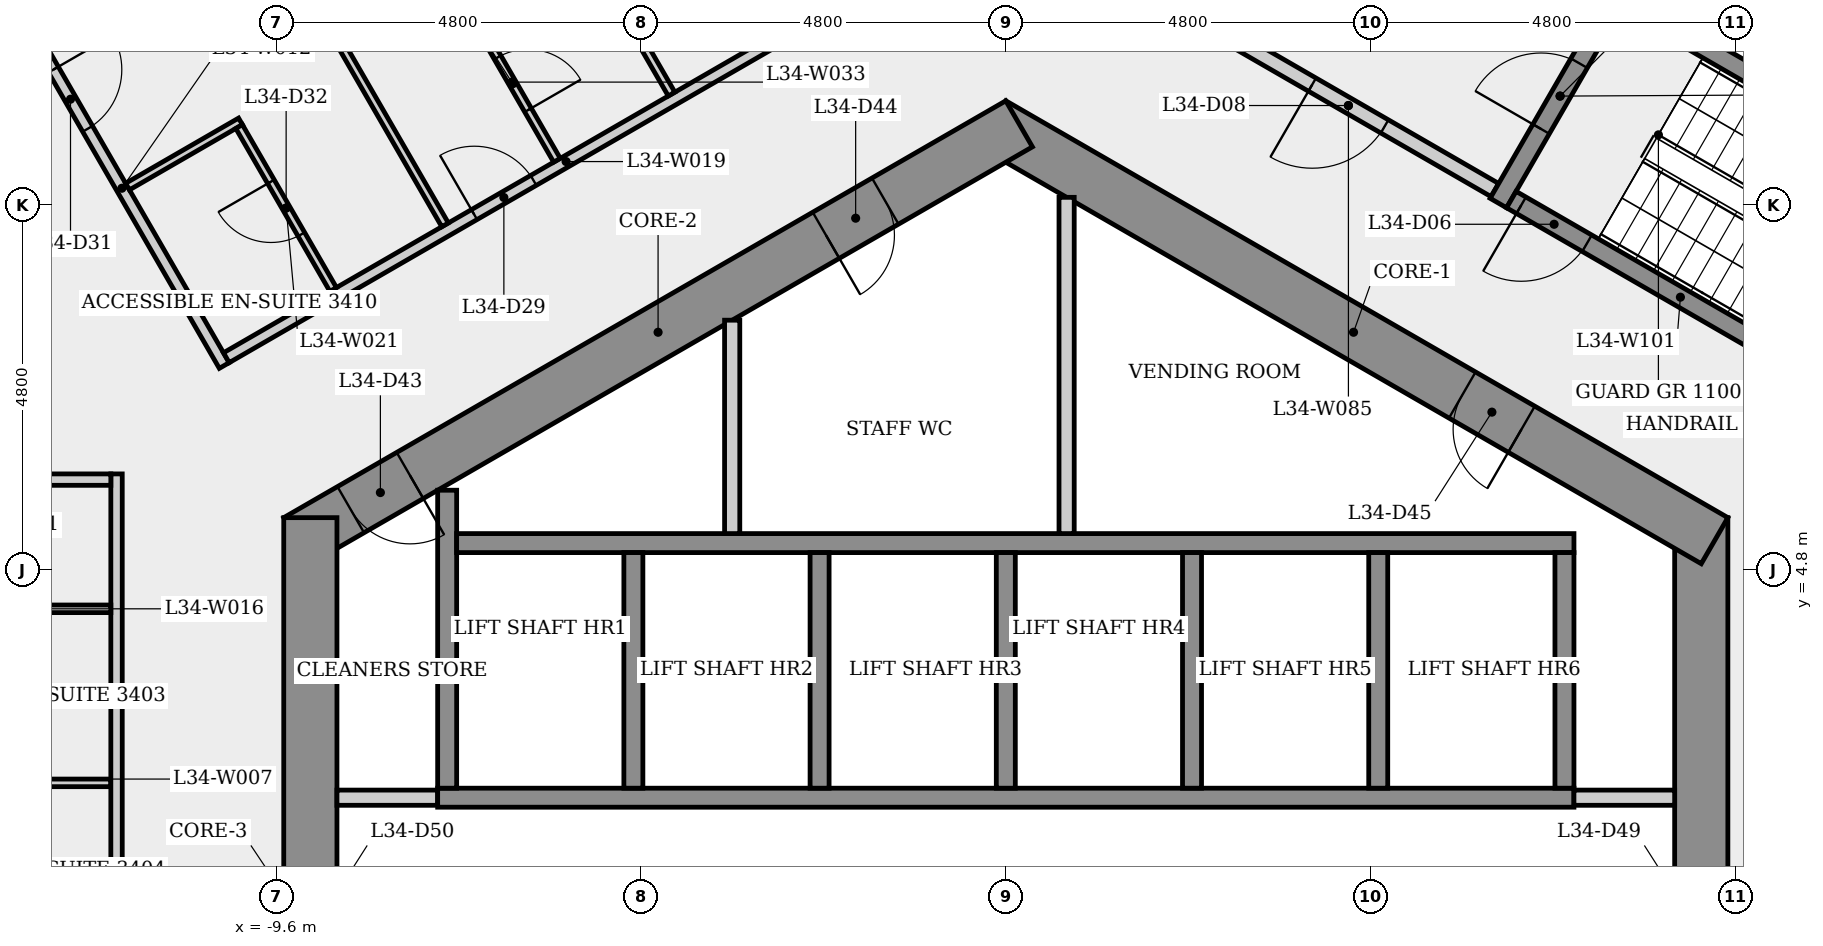
"""IFC4 building model, lengths in metres.
Left out: names, types, materials, properties, quantities, classifications, styles, units other than length and angle.
Written with IfcOpenShell. Run it as: python <this file> out.ifc"""

import sys

from ifc_helpers import new_model, si_unit, direction, frame, frame_2d, origin, place, context, subcontext, project, spatial, rectangle, extrude, element, fill, save


model = new_model("IFC4")
c1 = context("Model", 3, precision=1e-05, world=origin(), true_north=direction((0.0, 1.0)))
c2 = subcontext(c1, "Body", "Model", "MODEL_VIEW")
j1 = project(units=[si_unit("LENGTHUNIT", "METRE"), si_unit("PLANEANGLEUNIT", "RADIAN")], contexts=[c1])
p1 = place(None, origin())
s1 = spatial("IfcSite", under=j1, at=p1, CompositionType="ELEMENT")
p2 = place(p1, origin())
s2 = spatial("IfcBuilding", under=s1, at=p2, CompositionType="ELEMENT")
p3 = place(p2, frame((0.0, 0.0, 128.5)))
s3 = spatial("IfcBuildingStorey", under=s2, at=p3, CompositionType="ELEMENT", Elevation=128.5)
p4 = place(p3, frame((9.15, -5.485, 0.0), z_axis=(0.0, 0.0, 1.0), x_axis=(0.0, 1.0, 0.0)))
e1 = element("IfcWall", 1, at=p4, inside=s3, PredefinedType="SHEAR", context=c2, shape_type="SweptSolid", body=[
    extrude(rectangle(XDim=10.97, YDim=0.7, at=frame_2d((5.485, 0.0))), origin(), (0.0, 0.0, 1.0), 4.0),
])
p5 = place(p4, frame((4.685, 0.0, 0.0)))
e2 = element("IfcOpeningElement", 2, at=p5, cuts=e1, PredefinedType="OPENING", context=c2, shape_type="SweptSolid", body=[
    extrude(rectangle(XDim=1.6, YDim=2.1, at=frame_2d((0.8, 1.05))), frame((0.0, 0.36, 0.0), z_axis=(0.0, -1.0, 0.0), x_axis=(1.0, 0.0, 0.0)), (0.0, 0.0, 1.0), 0.72),
])
p6 = place(p3, frame((9.325, 5.182, 0.0), z_axis=(0.0, 0.0, 1.0), x_axis=(-0.866023993627, 0.500002442456, 0.0)))
e3 = element("IfcWall", 3, at=p6, inside=s3, PredefinedType="SHEAR", context=c2, shape_type="SweptSolid", body=[
    extrude(rectangle(XDim=10.97, YDim=0.7, at=frame_2d((5.485, 0.0))), origin(), (0.0, 0.0, 1.0), 4.0),
])
p7 = place(p6, frame((2.933, 0.0, 0.0)))
e4 = element("IfcOpeningElement", 4, at=p7, cuts=e3, PredefinedType="OPENING", context=c2, shape_type="SweptSolid", body=[
    extrude(rectangle(XDim=0.9, YDim=2.1, at=frame_2d((0.45, 1.05))), frame((0.0, 0.36, 0.0), z_axis=(0.0, -1.0, 0.0), x_axis=(1.0, 0.0, 0.0)), (0.0, 0.0, 1.0), 0.72),
])
p8 = place(p3, frame((0.175, 10.667, 0.0), z_axis=(0.0, 0.0, 1.0), x_axis=(-0.866023993627, -0.500002442456, 0.0)))
e5 = element("IfcWall", 5, at=p8, inside=s3, PredefinedType="SHEAR", context=c2, shape_type="SweptSolid", body=[
    extrude(rectangle(XDim=10.97, YDim=0.7, at=frame_2d((5.485, 0.0))), origin(), (0.0, 0.0, 1.0), 4.0),
])
p9 = place(p8, frame((9.254, 0.0, 0.0)))
e6 = element("IfcOpeningElement", 6, at=p9, cuts=e5, PredefinedType="OPENING", context=c2, shape_type="SweptSolid", body=[
    extrude(rectangle(XDim=0.9, YDim=2.1, at=frame_2d((0.45, 1.05))), frame((0.0, 0.36, 0.0), z_axis=(0.0, -1.0, 0.0), x_axis=(1.0, 0.0, 0.0)), (0.0, 0.0, 1.0), 0.72),
])
p10 = place(p8, frame((2.033, 0.0, 0.0)))
e7 = element("IfcOpeningElement", 7, at=p10, cuts=e5, PredefinedType="OPENING", context=c2, shape_type="SweptSolid", body=[
    extrude(rectangle(XDim=0.9, YDim=2.1, at=frame_2d((0.45, 1.05))), frame((0.0, 0.36, 0.0), z_axis=(0.0, -1.0, 0.0), x_axis=(1.0, 0.0, 0.0)), (0.0, 0.0, 1.0), 0.72),
])
p11 = place(p3, frame((-9.15, 5.485, 0.0), z_axis=(0.0, 0.0, 1.0), x_axis=(0.0, -1.0, 0.0)))
e8 = element("IfcWall", 8, at=p11, inside=s3, PredefinedType="SHEAR", context=c2, shape_type="SweptSolid", body=[
    extrude(rectangle(XDim=10.97, YDim=0.7, at=frame_2d((5.485, 0.0))), origin(), (0.0, 0.0, 1.0), 4.0),
])
p12 = place(p11, frame((4.685, 0.0, 0.0)))
e9 = element("IfcOpeningElement", 9, at=p12, cuts=e8, PredefinedType="OPENING", context=c2, shape_type="SweptSolid", body=[
    extrude(rectangle(XDim=1.6, YDim=2.1, at=frame_2d((0.8, 1.05))), frame((0.0, 0.36, 0.0), z_axis=(0.0, -1.0, 0.0), x_axis=(1.0, 0.0, 0.0)), (0.0, 0.0, 1.0), 0.72),
])
p13 = place(p3, frame((-18.693, 1.995, 0.0), z_axis=(0.0, 0.0, 1.0), x_axis=(1.0, 0.0, 0.0)))
e10 = element("IfcWall", 10, at=p13, inside=s3, PredefinedType="PARTITIONING", context=c2, shape_type="SweptSolid", body=[
    extrude(rectangle(XDim=6.918, YDim=0.1, at=frame_2d((3.459, 0.0))), origin(), (0.0, 0.0, 1.0), 3.65),
])
p14 = place(p3, frame((-12.976, 12.152, 0.0), z_axis=(0.0, 0.0, 1.0), x_axis=(0.500019321912, -0.866014247986, 0.0)))
e11 = element("IfcWall", 11, at=p14, inside=s3, PredefinedType="PARTITIONING", context=c2, shape_type="SweptSolid", body=[
    extrude(rectangle(XDim=5.386, YDim=0.15, at=frame_2d((2.693, 0.0))), origin(), (0.0, 0.0, 1.0), 3.65),
])
p15 = place(p14, frame((0.891, 0.0, 0.0)))
e12 = element("IfcOpeningElement", 12, at=p15, cuts=e11, PredefinedType="OPENING", context=c2, shape_type="SweptSolid", body=[
    extrude(rectangle(XDim=0.9, YDim=2.1, at=frame_2d((0.45, 1.05))), frame((0.0, 0.085, 0.0), z_axis=(0.0, -1.0, 0.0), x_axis=(1.0, 0.0, 0.0)), (0.0, 0.0, 1.0), 0.17),
])
p16 = place(p3, frame((-11.7, 6.06, 0.0), z_axis=(0.0, 0.0, 1.0), x_axis=(0.0, -1.0, 0.0)))
e13 = element("IfcWall", 13, at=p16, inside=s3, PredefinedType="PARTITIONING", context=c2, shape_type="SweptSolid", body=[
    extrude(rectangle(XDim=12.046, YDim=0.15, at=frame_2d((6.023, 0.0))), origin(), (0.0, 0.0, 1.0), 3.65),
])
p17 = place(p16, frame((6.755, 0.0, 0.0)))
e14 = element("IfcOpeningElement", 14, at=p17, cuts=e13, PredefinedType="OPENING", context=c2, shape_type="SweptSolid", body=[
    extrude(rectangle(XDim=0.9, YDim=2.1, at=frame_2d((0.45, 1.05))), frame((0.0, 0.085, 0.0), z_axis=(0.0, -1.0, 0.0), x_axis=(1.0, 0.0, 0.0)), (0.0, 0.0, 1.0), 0.17),
])
p18 = place(p3, frame((-11.775, 4.285, 0.0), z_axis=(0.0, 0.0, 1.0), x_axis=(-1.0, 0.0, 0.0)))
e15 = element("IfcWall", 15, at=p18, inside=s3, PredefinedType="PARTITIONING", context=c2, shape_type="SweptSolid", body=[
    extrude(rectangle(XDim=2.475, YDim=0.1, at=frame_2d((1.238, 0.0))), origin(), (0.0, 0.0, 1.0), 3.65),
])
p19 = place(p18, frame((0.837, 0.0, 0.0)))
e16 = element("IfcOpeningElement", 16, at=p19, cuts=e15, PredefinedType="OPENING", context=c2, shape_type="SweptSolid", body=[
    extrude(rectangle(XDim=0.8, YDim=2.1, at=frame_2d((0.4, 1.05))), frame((0.0, 0.06, 0.0), z_axis=(0.0, -1.0, 0.0), x_axis=(1.0, 0.0, 0.0)), (0.0, 0.0, 1.0), 0.12),
])
p20 = place(p3, frame((-11.775, 5.985, 0.0), z_axis=(0.0, 0.0, 1.0), x_axis=(-1.0, 0.0, 0.0)))
e17 = element("IfcWall", 17, at=p20, inside=s3, PredefinedType="PARTITIONING", context=c2, shape_type="SweptSolid", body=[
    extrude(rectangle(XDim=4.761, YDim=0.15, at=frame_2d((2.381, 0.0))), origin(), (0.0, 0.0, 1.0), 3.65),
])
p21 = place(p20, frame((1.931, 0.0, 0.0)))
e18 = element("IfcOpeningElement", 18, at=p21, cuts=e17, PredefinedType="OPENING", context=c2, shape_type="SweptSolid", body=[
    extrude(rectangle(XDim=0.9, YDim=2.1, at=frame_2d((0.45, 1.05))), frame((0.0, 0.085, 0.0), z_axis=(0.0, -1.0, 0.0), x_axis=(1.0, 0.0, 0.0)), (0.0, 0.0, 1.0), 0.17),
])
p22 = place(p3, frame((-10.255, 7.589, 0.0), z_axis=(0.0, 0.0, 1.0), x_axis=(0.866015055687, 0.500017923002, 0.0)))
e19 = element("IfcWall", 19, at=p22, inside=s3, PredefinedType="PARTITIONING", context=c2, shape_type="SweptSolid", body=[
    extrude(rectangle(XDim=10.323, YDim=0.15, at=frame_2d((5.162, 0.0))), origin(), (0.0, 0.0, 1.0), 3.65),
])
p23 = place(p22, frame((3.766, 0.0, 0.0)))
e20 = element("IfcOpeningElement", 20, at=p23, cuts=e19, PredefinedType="OPENING", context=c2, shape_type="SweptSolid", body=[
    extrude(rectangle(XDim=0.9, YDim=2.1, at=frame_2d((0.45, 1.05))), frame((0.0, 0.085, 0.0), z_axis=(0.0, -1.0, 0.0), x_axis=(1.0, 0.0, 0.0)), (0.0, 0.0, 1.0), 0.17),
])
p24 = place(p3, frame((-10.069, 10.699, 0.0), z_axis=(0.0, 0.0, 1.0), x_axis=(-0.865984193376, -0.500071371729, 0.0)))
e21 = element("IfcWall", 21, at=p24, inside=s3, PredefinedType="PARTITIONING", context=c2, shape_type="SweptSolid", body=[
    extrude(rectangle(XDim=1.716, YDim=0.1, at=frame_2d((0.858, 0.0))), origin(), (0.0, 0.0, 1.0), 3.65),
])
p25 = place(p3, frame((-8.85, 8.487, 0.0), z_axis=(0.0, 0.0, 1.0), x_axis=(-0.500032699561, 0.866006523861, 0.0)))
e22 = element("IfcWall", 22, at=p25, inside=s3, PredefinedType="PARTITIONING", context=c2, shape_type="SweptSolid", body=[
    extrude(rectangle(XDim=2.475, YDim=0.1, at=frame_2d((1.237, 0.0))), origin(), (0.0, 0.0, 1.0), 3.65),
])
p26 = place(p25, frame((0.837, 0.0, 0.0)))
e23 = element("IfcOpeningElement", 23, at=p26, cuts=e22, PredefinedType="OPENING", context=c2, shape_type="SweptSolid", body=[
    extrude(rectangle(XDim=0.8, YDim=2.1, at=frame_2d((0.4, 1.05))), frame((0.0, 0.06, 0.0), z_axis=(0.0, -1.0, 0.0), x_axis=(1.0, 0.0, 0.0)), (0.0, 0.0, 1.0), 0.12),
])
p27 = place(p3, frame((-8.8, 1.8, 0.0), z_axis=(0.0, 0.0, 1.0), x_axis=(1.0, 0.0, 0.0)))
e24 = element("IfcWall", 24, at=p27, inside=s3, PredefinedType="PARTITIONING", context=c2, shape_type="SweptSolid", body=[
    extrude(rectangle(XDim=1.325, YDim=0.2, at=frame_2d((0.663, 0.0))), origin(), (0.0, 0.0, 1.0), 3.65),
])
p28 = place(p3, frame((-7.475, 1.8, 0.0), z_axis=(0.0, 0.0, 1.0), x_axis=(1.0, 0.0, 0.0)))
e25 = element("IfcWall", 25, at=p28, inside=s3, PredefinedType="SHEAR", context=c2, shape_type="SweptSolid", body=[
    extrude(rectangle(XDim=14.95, YDim=0.25, at=frame_2d((7.475, 0.0))), origin(), (0.0, 0.0, 1.0), 3.65),
])
p29 = place(p3, frame((-7.35, 1.925, 0.0), z_axis=(0.0, 0.0, 1.0), x_axis=(0.0, 1.0, 0.0)))
e26 = element("IfcWall", 26, at=p29, inside=s3, PredefinedType="SHEAR", context=c2, shape_type="SweptSolid", body=[
    extrude(rectangle(XDim=3.921, YDim=0.25, at=frame_2d((1.96, 0.0))), origin(), (0.0, 0.0, 1.0), 3.65),
])
p30 = place(p3, frame((-7.225, 5.15, 0.0), z_axis=(0.0, 0.0, 1.0), x_axis=(1.0, 0.0, 0.0)))
e27 = element("IfcWall", 27, at=p30, inside=s3, PredefinedType="SHEAR", context=c2, shape_type="SweptSolid", body=[
    extrude(rectangle(XDim=14.7, YDim=0.25, at=frame_2d((7.35, 0.0))), origin(), (0.0, 0.0, 1.0), 3.65),
])
p31 = place(p3, frame((-7.378, 9.337, 0.0), z_axis=(0.0, 0.0, 1.0), x_axis=(-0.499997453958, 0.866026873738, 0.0)))
e28 = element("IfcWall", 28, at=p31, inside=s3, PredefinedType="PARTITIONING", context=c2, shape_type="SweptSolid", body=[
    extrude(rectangle(XDim=7.71, YDim=0.1, at=frame_2d((3.855, 0.0))), origin(), (0.0, 0.0, 1.0), 3.65),
])
p32 = place(p3, frame((-7.093, 12.244, 0.0), z_axis=(0.0, 0.0, 1.0), x_axis=(0.500030943131, -0.866007538022, 0.0)))
e29 = element("IfcWall", 29, at=p32, inside=s3, PredefinedType="PARTITIONING", context=c2, shape_type="SweptSolid", body=[
    extrude(rectangle(XDim=2.375, YDim=0.1, at=frame_2d((1.188, 0.0))), origin(), (0.0, 0.0, 1.0), 3.65),
])
p33 = place(p32, frame((0.812, 0.0, 0.0)))
e30 = element("IfcOpeningElement", 30, at=p33, cuts=e29, PredefinedType="OPENING", context=c2, shape_type="SweptSolid", body=[
    extrude(rectangle(XDim=0.8, YDim=2.1, at=frame_2d((0.4, 1.05))), frame((0.0, 0.06, 0.0), z_axis=(0.0, -1.0, 0.0), x_axis=(1.0, 0.0, 0.0)), (0.0, 0.0, 1.0), 0.12),
])
p34 = place(p3, frame((-8.253, 17.735, 0.0), z_axis=(0.0, 0.0, 1.0), x_axis=(0.499983743644, -0.866034789193, 0.0)))
e31 = element("IfcWall", 31, at=p34, inside=s3, PredefinedType="PARTITIONING", context=c2, shape_type="SweptSolid", body=[
    extrude(rectangle(XDim=7.711, YDim=0.1, at=frame_2d((3.855, 0.0))), origin(), (0.0, 0.0, 1.0), 3.65),
])
p35 = place(p3, frame((-4.9, 5.025, 0.0), z_axis=(0.0, 0.0, 1.0), x_axis=(0.0, -1.0, 0.0)))
e32 = element("IfcWall", 32, at=p35, inside=s3, PredefinedType="SHEAR", context=c2, shape_type="SweptSolid", body=[
    extrude(rectangle(XDim=3.1, YDim=0.25, at=frame_2d((1.55, 0.0))), origin(), (0.0, 0.0, 1.0), 4.0),
])
p36 = place(p3, frame((-3.6, 8.083, 0.0), z_axis=(0.0, 0.0, 1.0), x_axis=(0.0, -1.0, 0.0)))
e33 = element("IfcWall", 33, at=p36, inside=s3, PredefinedType="PARTITIONING", context=c2, shape_type="SweptSolid", body=[
    extrude(rectangle(XDim=2.808, YDim=0.2, at=frame_2d((1.404, 0.0))), origin(), (0.0, 0.0, 1.0), 3.65),
])
for number, where, z_axis, x_axis in (
    (34, (-2.45, 5.025, 0.0), (0.0, 0.0, 1.0), (0.0, -1.0, 0.0)),
    (35, (0.0, 5.025, 0.0), (0.0, 0.0, 1.0), (0.0, -1.0, 0.0)),
):
    element("IfcWall", number, at=place(p3, frame(where, z_axis=z_axis, x_axis=x_axis)), inside=s3, PredefinedType="SHEAR", context=c2, shape_type="SweptSolid", body=[
        extrude(rectangle(XDim=3.1, YDim=0.25, at=frame_2d((1.55, 0.0))), origin(), (0.0, 0.0, 1.0), 4.0),
    ])
p37 = place(p3, frame((0.8, 9.699, 0.0), z_axis=(0.0, 0.0, 1.0), x_axis=(0.0, -1.0, 0.0)))
e36 = element("IfcWall", 36, at=p37, inside=s3, PredefinedType="PARTITIONING", context=c2, shape_type="SweptSolid", body=[
    extrude(rectangle(XDim=4.425, YDim=0.2, at=frame_2d((2.212, 0.0))), origin(), (0.0, 0.0, 1.0), 3.65),
])
for number, where, z_axis, x_axis in (
    (37, (2.45, 5.025, 0.0), (0.0, 0.0, 1.0), (0.0, -1.0, 0.0)),
    (38, (4.9, 5.025, 0.0), (0.0, 0.0, 1.0), (0.0, -1.0, 0.0)),
):
    element("IfcWall", number, at=place(p3, frame(where, z_axis=z_axis, x_axis=x_axis)), inside=s3, PredefinedType="SHEAR", context=c2, shape_type="SweptSolid", body=[
        extrude(rectangle(XDim=3.1, YDim=0.25, at=frame_2d((1.55, 0.0))), origin(), (0.0, 0.0, 1.0), 4.0),
    ])
p38 = place(p3, frame((6.435, 9.795, 0.0), z_axis=(0.0, 0.0, 1.0), x_axis=(-0.866012907634, 0.500021643343, 0.0)))
e39 = element("IfcWall", 39, at=p38, inside=s3, PredefinedType="PARTITIONING", context=c2, shape_type="SweptSolid", body=[
    extrude(rectangle(XDim=4.45, YDim=0.2, at=frame_2d((2.225, 0.0))), origin(), (0.0, 0.0, 1.0), 3.65),
])
p39 = place(p38, frame((1.675, 0.0, 0.0)))
e40 = element("IfcOpeningElement", 40, at=p39, cuts=e39, PredefinedType="OPENING", context=c2, shape_type="SweptSolid", body=[
    extrude(rectangle(XDim=1.1, YDim=2.1, at=frame_2d((0.55, 1.05))), frame((0.0, 0.11, 0.0), z_axis=(0.0, -1.0, 0.0), x_axis=(1.0, 0.0, 0.0)), (0.0, 0.0, 1.0), 0.22),
])
p40 = place(p3, frame((6.48, 9.624, 0.0), z_axis=(0.0, 0.0, 1.0), x_axis=(0.500017246033, 0.866015446554, 0.0)))
e41 = element("IfcWall", 41, at=p40, inside=s3, PredefinedType="SHEAR", context=c2, shape_type="SweptSolid", body=[
    extrude(rectangle(XDim=3.25, YDim=0.25, at=frame_2d((1.625, 0.0))), origin(), (0.0, 0.0, 1.0), 3.65),
])
p41 = place(p40, frame((1.125, 0.0, 0.0)))
e42 = element("IfcOpeningElement", 42, at=p41, cuts=e41, PredefinedType="OPENING", context=c2, shape_type="SweptSolid", body=[
    extrude(rectangle(XDim=1.0, YDim=2.1, at=frame_2d((0.5, 1.05))), frame((0.0, 0.135, 0.0), z_axis=(0.0, -1.0, 0.0), x_axis=(1.0, 0.0, 0.0)), (0.0, 0.0, 1.0), 0.27),
])
p42 = place(p3, frame((7.475, 1.8, 0.0), z_axis=(0.0, 0.0, 1.0), x_axis=(1.0, 0.0, 0.0)))
e43 = element("IfcWall", 43, at=p42, inside=s3, PredefinedType="PARTITIONING", context=c2, shape_type="SweptSolid", body=[
    extrude(rectangle(XDim=1.325, YDim=0.2, at=frame_2d((0.663, 0.0))), origin(), (0.0, 0.0, 1.0), 3.65),
])
p43 = place(p3, frame((7.35, 5.025, 0.0), z_axis=(0.0, 0.0, 1.0), x_axis=(0.0, -1.0, 0.0)))
e44 = element("IfcWall", 44, at=p43, inside=s3, PredefinedType="SHEAR", context=c2, shape_type="SweptSolid", body=[
    extrude(rectangle(XDim=3.1, YDim=0.25, at=frame_2d((1.55, 0.0))), origin(), (0.0, 0.0, 1.0), 4.0),
])
p44 = place(p3, frame((8.151, 12.268, 0.0), z_axis=(0.0, 0.0, 1.0), x_axis=(0.866025499775, -0.499999833739, 0.0)))
e45 = element("IfcWall", 45, at=p44, inside=s3, PredefinedType="SHEAR", context=c2, shape_type="SweptSolid", body=[
    extrude(rectangle(XDim=6.4, YDim=0.25, at=frame_2d((3.2, 0.0))), origin(), (0.0, 0.0, 1.0), 3.65),
])
p45 = place(p3, frame((11.1, 7.101, 0.0), z_axis=(0.0, 0.0, 1.0), x_axis=(-0.8660265141, 0.499998076872, 0.0)))
e46 = element("IfcWall", 46, at=p45, inside=s3, PredefinedType="SHEAR", context=c2, shape_type="SweptSolid", body=[
    extrude(rectangle(XDim=5.137, YDim=0.25, at=frame_2d((2.569, 0.0))), origin(), (0.0, 0.0, 1.0), 3.65),
])
p46 = place(p45, frame((3.987, 0.0, 0.0)))
e47 = element("IfcOpeningElement", 47, at=p46, cuts=e46, PredefinedType="OPENING", context=c2, shape_type="SweptSolid", body=[
    extrude(rectangle(XDim=1.0, YDim=2.1, at=frame_2d((0.5, 1.05))), frame((0.0, 0.135, 0.0), z_axis=(0.0, -1.0, 0.0), x_axis=(1.0, 0.0, 0.0)), (0.0, 0.0, 1.0), 0.27),
])
p47 = place(p46, origin())
e48 = element("IfcDoor", 48, at=p47, inside=s3, OperationType="SINGLE_SWING_RIGHT", PredefinedType="DOOR", context=c2, shape_type="SweptSolid", body=[
    extrude(rectangle(XDim=1.0, YDim=2.1, at=frame_2d((0.5, 1.05))), frame((0.0, 0.025, 0.0), z_axis=(0.0, -1.0, 0.0), x_axis=(1.0, 0.0, 0.0)), (0.0, 0.0, 1.0), 0.05),
])
fill(e47, e48)
p48 = place(p41, origin())
e49 = element("IfcDoor", 49, at=p48, inside=s3, OperationType="SINGLE_SWING_LEFT", PredefinedType="DOOR", context=c2, shape_type="SweptSolid", body=[
    extrude(rectangle(XDim=1.0, YDim=2.1, at=frame_2d((0.5, 1.05))), frame((0.0, 0.025, 0.0), z_axis=(0.0, -1.0, 0.0), x_axis=(1.0, 0.0, 0.0)), (0.0, 0.0, 1.0), 0.05),
])
fill(e42, e49)
p49 = place(p39, origin())
e50 = element("IfcDoor", 50, at=p49, inside=s3, OperationType="SINGLE_SWING_RIGHT", PredefinedType="DOOR", context=c2, shape_type="SweptSolid", body=[
    extrude(rectangle(XDim=1.1, YDim=2.1, at=frame_2d((0.55, 1.05))), frame((0.0, 0.025, 0.0), z_axis=(0.0, -1.0, 0.0), x_axis=(1.0, 0.0, 0.0)), (0.0, 0.0, 1.0), 0.05),
])
fill(e40, e50)
p50 = place(p23, origin())
e51 = element("IfcDoor", 51, at=p50, inside=s3, OperationType="SINGLE_SWING_LEFT", PredefinedType="DOOR", context=c2, shape_type="SweptSolid", body=[
    extrude(rectangle(XDim=0.9, YDim=2.1, at=frame_2d((0.45, 1.05))), frame((0.0, 0.025, 0.0), z_axis=(0.0, -1.0, 0.0), x_axis=(1.0, 0.0, 0.0)), (0.0, 0.0, 1.0), 0.05),
])
fill(e20, e51)
p51 = place(p33, origin())
e52 = element("IfcDoor", 52, at=p51, inside=s3, OperationType="SINGLE_SWING_RIGHT", PredefinedType="DOOR", context=c2, shape_type="SweptSolid", body=[
    extrude(rectangle(XDim=0.8, YDim=2.1, at=frame_2d((0.4, 1.05))), frame((0.0, 0.025, 0.0), z_axis=(0.0, -1.0, 0.0), x_axis=(1.0, 0.0, 0.0)), (0.0, 0.0, 1.0), 0.05),
])
fill(e30, e52)
p52 = place(p15, origin())
e53 = element("IfcDoor", 53, at=p52, inside=s3, OperationType="SINGLE_SWING_LEFT", PredefinedType="DOOR", context=c2, shape_type="SweptSolid", body=[
    extrude(rectangle(XDim=0.9, YDim=2.1, at=frame_2d((0.45, 1.05))), frame((0.0, 0.025, 0.0), z_axis=(0.0, -1.0, 0.0), x_axis=(1.0, 0.0, 0.0)), (0.0, 0.0, 1.0), 0.05),
])
fill(e12, e53)
p53 = place(p26, origin())
e54 = element("IfcDoor", 54, at=p53, inside=s3, OperationType="SINGLE_SWING_RIGHT", PredefinedType="DOOR", context=c2, shape_type="SweptSolid", body=[
    extrude(rectangle(XDim=0.8, YDim=2.1, at=frame_2d((0.4, 1.05))), frame((0.0, 0.025, 0.0), z_axis=(0.0, -1.0, 0.0), x_axis=(1.0, 0.0, 0.0)), (0.0, 0.0, 1.0), 0.05),
])
fill(e23, e54)
p54 = place(p9, origin())
e55 = element("IfcDoor", 55, at=p54, inside=s3, OperationType="SINGLE_SWING_LEFT", PredefinedType="DOOR", context=c2, shape_type="SweptSolid", body=[
    extrude(rectangle(XDim=0.9, YDim=2.1, at=frame_2d((0.45, 1.05))), frame((0.0, 0.025, 0.0), z_axis=(0.0, -1.0, 0.0), x_axis=(1.0, 0.0, 0.0)), (0.0, 0.0, 1.0), 0.05),
])
fill(e6, e55)
p55 = place(p10, origin())
e56 = element("IfcDoor", 56, at=p55, inside=s3, OperationType="SINGLE_SWING_RIGHT", PredefinedType="DOOR", context=c2, shape_type="SweptSolid", body=[
    extrude(rectangle(XDim=0.9, YDim=2.1, at=frame_2d((0.45, 1.05))), frame((0.0, 0.025, 0.0), z_axis=(0.0, -1.0, 0.0), x_axis=(1.0, 0.0, 0.0)), (0.0, 0.0, 1.0), 0.05),
])
fill(e7, e56)
p56 = place(p7, origin())
e57 = element("IfcDoor", 57, at=p56, inside=s3, OperationType="SINGLE_SWING_LEFT", PredefinedType="DOOR", context=c2, shape_type="SweptSolid", body=[
    extrude(rectangle(XDim=0.9, YDim=2.1, at=frame_2d((0.45, 1.05))), frame((0.0, 0.025, 0.0), z_axis=(0.0, -1.0, 0.0), x_axis=(1.0, 0.0, 0.0)), (0.0, 0.0, 1.0), 0.05),
])
fill(e4, e57)
save(model, sys.argv[1])
